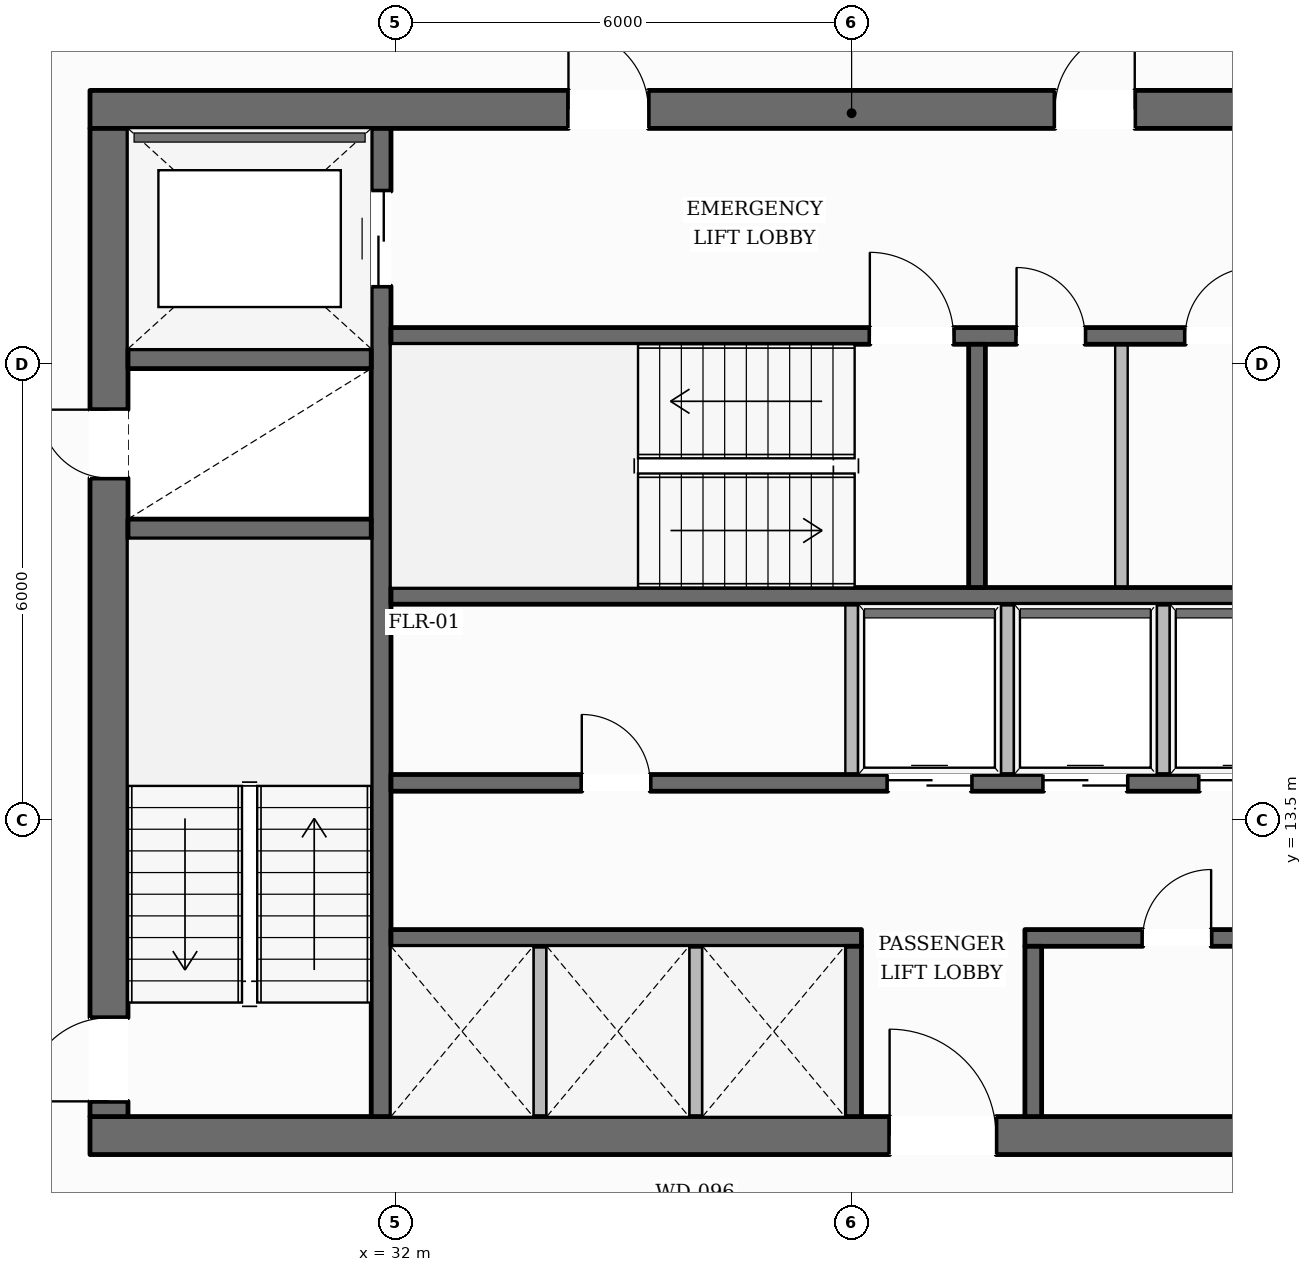
"""IFC4 building model, lengths in metres.
Left out: names, types, materials, properties, quantities, classifications, styles, units other than length and angle.
Written with IfcOpenShell. Run it as: python <this file> out.ifc"""

import sys

from ifc_helpers import new_model, si_unit, direction, frame, frame_2d, origin, place, context, subcontext, project, spatial, rectangle, extrude, element, fill, save


model = new_model("IFC4")
c1 = context("Model", 3, precision=1e-05, world=origin(), true_north=direction((0.0, 1.0)))
c2 = subcontext(c1, "Body", "Model", "MODEL_VIEW")
j1 = project(units=[si_unit("LENGTHUNIT", "METRE"), si_unit("PLANEANGLEUNIT", "RADIAN")], contexts=[c1])
p1 = place(None, origin())
s1 = spatial("IfcSite", under=j1, at=p1, CompositionType="ELEMENT")
p2 = place(p1, origin())
s2 = spatial("IfcBuilding", under=s1, at=p2, CompositionType="ELEMENT")
p3 = place(p2, frame((0.0, 0.0, 120.15)))
s3 = spatial("IfcBuildingStorey", under=s2, at=p3, CompositionType="ELEMENT", Elevation=120.15)
p4 = place(p3, frame((27.98, 9.35, 0.0), z_axis=(0.0, 0.0, 1.0), x_axis=(1.0, 0.0, 0.0)))
e1 = element("IfcWall", 1, at=p4, inside=s3, PredefinedType="SOLIDWALL", context=c2, shape_type="SweptSolid", body=[
    extrude(rectangle(XDim=20.04, YDim=0.5, at=frame_2d((10.02, 0.0))), origin(), (0.0, 0.0, 1.0), 3.6),
])
p5 = place(p4, frame((10.52, 0.0, 0.0)))
e2 = element("IfcOpeningElement", 2, at=p5, cuts=e1, PredefinedType="OPENING", context=c2, shape_type="SweptSolid", body=[
    extrude(rectangle(XDim=1.4, YDim=2.2, at=frame_2d((0.7, 1.1))), frame((0.0, 0.26, 0.0), z_axis=(0.0, -1.0, 0.0), x_axis=(1.0, 0.0, 0.0)), (0.0, 0.0, 1.0), 0.52),
])
p6 = place(p3, frame((27.98, 22.85, 0.0), z_axis=(0.0, 0.0, 1.0), x_axis=(1.0, 0.0, 0.0)))
e3 = element("IfcWall", 3, at=p6, inside=s3, PredefinedType="SOLIDWALL", context=c2, shape_type="SweptSolid", body=[
    extrude(rectangle(XDim=20.04, YDim=0.5, at=frame_2d((10.02, 0.0))), origin(), (0.0, 0.0, 1.0), 3.6),
])
p7 = place(p6, frame((6.295, 0.0, 0.0)))
e4 = element("IfcOpeningElement", 4, at=p7, cuts=e3, PredefinedType="OPENING", context=c2, shape_type="SweptSolid", body=[
    extrude(rectangle(XDim=1.05, YDim=2.15, at=frame_2d((0.525, 1.075))), frame((0.0, 0.26, 0.0), z_axis=(0.0, -1.0, 0.0), x_axis=(1.0, 0.0, 0.0)), (0.0, 0.0, 1.0), 0.52),
])
p8 = place(p6, frame((12.695, 0.0, 0.0)))
e5 = element("IfcOpeningElement", 5, at=p8, cuts=e3, PredefinedType="OPENING", context=c2, shape_type="SweptSolid", body=[
    extrude(rectangle(XDim=1.05, YDim=2.15, at=frame_2d((0.525, 1.075))), frame((0.0, 0.26, 0.0), z_axis=(0.0, -1.0, 0.0), x_axis=(1.0, 0.0, 0.0)), (0.0, 0.0, 1.0), 0.52),
])
p9 = place(p3, frame((28.23, 9.6, 0.0), z_axis=(0.0, 0.0, 1.0), x_axis=(0.0, 1.0, 0.0)))
e6 = element("IfcWall", 6, at=p9, inside=s3, PredefinedType="SOLIDWALL", context=c2, shape_type="SweptSolid", body=[
    extrude(rectangle(XDim=13.0, YDim=0.5, at=frame_2d((6.5, 0.0))), origin(), (0.0, 0.0, 1.0), 3.6),
])
p10 = place(p9, frame((0.2, 0.0, 0.0)))
e7 = element("IfcOpeningElement", 7, at=p10, cuts=e6, PredefinedType="OPENING", context=c2, shape_type="SweptSolid", body=[
    extrude(rectangle(XDim=1.1, YDim=2.15, at=frame_2d((0.55, 1.075))), frame((0.0, 0.26, 0.0), z_axis=(0.0, -1.0, 0.0), x_axis=(1.0, 0.0, 0.0)), (0.0, 0.0, 1.0), 0.52),
])
p11 = place(p9, frame((8.4, 0.0, 0.0)))
e8 = element("IfcOpeningElement", 8, at=p11, cuts=e6, PredefinedType="OPENING", context=c2, shape_type="SweptSolid", body=[
    extrude(rectangle(XDim=0.9, YDim=2.1, at=frame_2d((0.45, 1.05))), frame((0.0, 0.26, 0.0), z_axis=(0.0, -1.0, 0.0), x_axis=(1.0, 0.0, 0.0)), (0.0, 0.0, 1.0), 0.52),
])
p12 = place(p3, frame((31.81, 9.6, 0.0), z_axis=(0.0, 0.0, 1.0), x_axis=(0.0, 1.0, 0.0)))
e9 = element("IfcWall", 9, at=p12, inside=s3, PredefinedType="SHEAR", context=c2, shape_type="SweptSolid", body=[
    extrude(rectangle(XDim=13.0, YDim=0.26, at=frame_2d((6.5, 0.0))), origin(), (0.0, 0.0, 1.0), 3.6),
])
p13 = place(p12, frame((10.925, 0.0, 0.0)))
e10 = element("IfcOpeningElement", 10, at=p13, cuts=e9, PredefinedType="OPENING", context=c2, shape_type="SweptSolid", body=[
    extrude(rectangle(XDim=1.25, YDim=2.25, at=frame_2d((0.625, 1.125))), frame((0.0, 0.14, 0.0), z_axis=(0.0, -1.0, 0.0), x_axis=(1.0, 0.0, 0.0)), (0.0, 0.0, 1.0), 0.28),
])
for number, where, z_axis, x_axis in (
    (11, (28.48, 17.33, 0.0), (0.0, 0.0, 1.0), (1.0, 0.0, 0.0)),
    (12, (28.48, 19.57, 0.0), (0.0, 0.0, 1.0), (1.0, 0.0, 0.0)),
):
    element("IfcWall", number, at=place(p3, frame(where, z_axis=z_axis, x_axis=x_axis)), inside=s3, PredefinedType="SHEAR", context=c2, shape_type="SweptSolid", body=[
        extrude(rectangle(XDim=3.2, YDim=0.26, at=frame_2d((1.6, 0.0))), origin(), (0.0, 0.0, 1.0), 3.6),
    ])
p14 = place(p3, frame((31.94, 19.87, 0.0), z_axis=(0.0, 0.0, 1.0), x_axis=(1.0, 0.0, 0.0)))
e13 = element("IfcWall", 13, at=p14, inside=s3, PredefinedType="SOLIDWALL", context=c2, shape_type="SweptSolid", body=[
    extrude(rectangle(XDim=12.12, YDim=0.22, at=frame_2d((6.06, 0.0))), origin(), (0.0, 0.0, 1.0), 3.6),
])
p15 = place(p14, frame((6.3, 0.0, 0.0)))
e14 = element("IfcOpeningElement", 14, at=p15, cuts=e13, PredefinedType="OPENING", context=c2, shape_type="SweptSolid", body=[
    extrude(rectangle(XDim=1.1, YDim=2.15, at=frame_2d((0.55, 1.075))), frame((0.0, 0.12, 0.0), z_axis=(0.0, -1.0, 0.0), x_axis=(1.0, 0.0, 0.0)), (0.0, 0.0, 1.0), 0.24),
])
p16 = place(p14, frame((8.23, 0.0, 0.0)))
e15 = element("IfcOpeningElement", 15, at=p16, cuts=e13, PredefinedType="OPENING", context=c2, shape_type="SweptSolid", body=[
    extrude(rectangle(XDim=0.9, YDim=2.1, at=frame_2d((0.45, 1.05))), frame((0.0, 0.12, 0.0), z_axis=(0.0, -1.0, 0.0), x_axis=(1.0, 0.0, 0.0)), (0.0, 0.0, 1.0), 0.24),
])
p17 = place(p14, frame((10.45, 0.0, 0.0)))
e16 = element("IfcOpeningElement", 16, at=p17, cuts=e13, PredefinedType="OPENING", context=c2, shape_type="SweptSolid", body=[
    extrude(rectangle(XDim=0.9, YDim=2.1, at=frame_2d((0.45, 1.05))), frame((0.0, 0.12, 0.0), z_axis=(0.0, -1.0, 0.0), x_axis=(1.0, 0.0, 0.0)), (0.0, 0.0, 1.0), 0.24),
])
p18 = place(p3, frame((31.94, 16.45, 0.0), z_axis=(0.0, 0.0, 1.0), x_axis=(1.0, 0.0, 0.0)))
e17 = element("IfcWall", 17, at=p18, inside=s3, PredefinedType="SOLIDWALL", context=c2, shape_type="SweptSolid", body=[
    extrude(rectangle(XDim=12.12, YDim=0.22, at=frame_2d((6.06, 0.0))), origin(), (0.0, 0.0, 1.0), 3.6),
])
p19 = place(p3, frame((39.65, 16.56, 0.0), z_axis=(0.0, 0.0, 1.0), x_axis=(0.0, 1.0, 0.0)))
e18 = element("IfcWall", 18, at=p19, inside=s3, PredefinedType="SOLIDWALL", context=c2, shape_type="SweptSolid", body=[
    extrude(rectangle(XDim=3.2, YDim=0.22, at=frame_2d((1.6, 0.0))), origin(), (0.0, 0.0, 1.0), 3.6),
])
p20 = place(p3, frame((31.94, 13.99, 0.0), z_axis=(0.0, 0.0, 1.0), x_axis=(1.0, 0.0, 0.0)))
e19 = element("IfcWall", 19, at=p20, inside=s3, PredefinedType="SOLIDWALL", context=c2, shape_type="SweptSolid", body=[
    extrude(rectangle(XDim=12.12, YDim=0.22, at=frame_2d((6.06, 0.0))), origin(), (0.0, 0.0, 1.0), 3.6),
])
p21 = place(p20, frame((2.51, 0.0, 0.0)))
e20 = element("IfcOpeningElement", 20, at=p21, cuts=e19, PredefinedType="OPENING", context=c2, shape_type="SweptSolid", body=[
    extrude(rectangle(XDim=0.9, YDim=2.1, at=frame_2d((0.45, 1.05))), frame((0.0, 0.12, 0.0), z_axis=(0.0, -1.0, 0.0), x_axis=(1.0, 0.0, 0.0)), (0.0, 0.0, 1.0), 0.24),
])
p22 = place(p20, frame((6.535, 0.0, 0.0)))
e21 = element("IfcOpeningElement", 21, at=p22, cuts=e19, PredefinedType="OPENING", context=c2, shape_type="SweptSolid", body=[
    extrude(rectangle(XDim=1.1, YDim=2.2, at=frame_2d((0.55, 1.1))), frame((0.0, 0.12, 0.0), z_axis=(0.0, -1.0, 0.0), x_axis=(1.0, 0.0, 0.0)), (0.0, 0.0, 1.0), 0.24),
])
p23 = place(p20, frame((8.585, 0.0, 0.0)))
e22 = element("IfcOpeningElement", 22, at=p23, cuts=e19, PredefinedType="OPENING", context=c2, shape_type="SweptSolid", body=[
    extrude(rectangle(XDim=1.1, YDim=2.2, at=frame_2d((0.55, 1.1))), frame((0.0, 0.12, 0.0), z_axis=(0.0, -1.0, 0.0), x_axis=(1.0, 0.0, 0.0)), (0.0, 0.0, 1.0), 0.24),
])
p24 = place(p20, frame((10.635, 0.0, 0.0)))
e23 = element("IfcOpeningElement", 23, at=p24, cuts=e19, PredefinedType="OPENING", context=c2, shape_type="SweptSolid", body=[
    extrude(rectangle(XDim=1.1, YDim=2.2, at=frame_2d((0.55, 1.1))), frame((0.0, 0.12, 0.0), z_axis=(0.0, -1.0, 0.0), x_axis=(1.0, 0.0, 0.0)), (0.0, 0.0, 1.0), 0.24),
])
p25 = place(p3, frame((31.94, 11.95, 0.0), z_axis=(0.0, 0.0, 1.0), x_axis=(1.0, 0.0, 0.0)))
e24 = element("IfcWall", 24, at=p25, inside=s3, PredefinedType="SOLIDWALL", context=c2, shape_type="SweptSolid", body=[
    extrude(rectangle(XDim=6.19, YDim=0.22, at=frame_2d((3.095, 0.0))), origin(), (0.0, 0.0, 1.0), 3.6),
])
p26 = place(p3, frame((40.28, 11.95, 0.0), z_axis=(0.0, 0.0, 1.0), x_axis=(1.0, 0.0, 0.0)))
e25 = element("IfcWall", 25, at=p26, inside=s3, PredefinedType="SOLIDWALL", context=c2, shape_type="SweptSolid", body=[
    extrude(rectangle(XDim=3.78, YDim=0.22, at=frame_2d((1.89, 0.0))), origin(), (0.0, 0.0, 1.0), 3.6),
])
p27 = place(p26, frame((1.55, 0.0, 0.0)))
e26 = element("IfcOpeningElement", 26, at=p27, cuts=e25, PredefinedType="OPENING", context=c2, shape_type="SweptSolid", body=[
    extrude(rectangle(XDim=0.9, YDim=2.1, at=frame_2d((0.45, 1.05))), frame((0.0, 0.12, 0.0), z_axis=(0.0, -1.0, 0.0), x_axis=(1.0, 0.0, 0.0)), (0.0, 0.0, 1.0), 0.24),
])
for number, where, z_axis, x_axis in (
    (27, (38.02, 9.6, 0.0), (0.0, 0.0, 1.0), (0.0, 1.0, 0.0)),
    (28, (40.39, 9.6, 0.0), (0.0, 0.0, 1.0), (0.0, 1.0, 0.0)),
):
    element("IfcWall", number, at=place(p3, frame(where, z_axis=z_axis, x_axis=x_axis)), inside=s3, PredefinedType="SOLIDWALL", context=c2, shape_type="SweptSolid", body=[
        extrude(rectangle(XDim=2.24, YDim=0.22, at=frame_2d((1.12, 0.0))), origin(), (0.0, 0.0, 1.0), 3.6),
    ])
p28 = place(p3, frame((13.966, 12.858, 0.0), z_axis=(0.0, 0.0, 1.0), x_axis=(0.499138995893, 0.86652193439, 0.0)))
e29 = element("IfcWall", 29, at=p28, inside=s3, PredefinedType="STANDARD", context=c2, shape_type="SweptSolid", body=[
    extrude(rectangle(XDim=36.509, YDim=0.38, at=frame_2d((18.255, 0.0))), origin(), (0.0, 0.0, 1.0), 3.059),
])
p29 = place(p28, frame((8.727, 0.0, 0.0)))
e30 = element("IfcOpeningElement", 30, at=p29, cuts=e29, PredefinedType="OPENING", context=c2, shape_type="SweptSolid", body=[
    extrude(rectangle(XDim=1.0, YDim=2.2, at=frame_2d((0.5, 1.1))), frame((0.0, 0.2, 0.0), z_axis=(0.0, -1.0, 0.0), x_axis=(1.0, 0.0, 0.0)), (0.0, 0.0, 1.0), 0.4),
])
p30 = place(p28, frame((32.292, 0.0, 0.65)))
e31 = element("IfcOpeningElement", 31, at=p30, cuts=e29, PredefinedType="OPENING", context=c2, shape_type="SweptSolid", body=[
    extrude(rectangle(XDim=1.55, YDim=1.75, at=frame_2d((0.775, 0.875))), frame((0.0, 0.2, 0.0), z_axis=(0.0, -1.0, 0.0), x_axis=(1.0, 0.0, 0.0)), (0.0, 0.0, 1.0), 0.4),
])
p31 = place(p28, frame((26.367, 0.0, 0.65)))
e32 = element("IfcOpeningElement", 32, at=p31, cuts=e29, PredefinedType="OPENING", context=c2, shape_type="SweptSolid", body=[
    extrude(rectangle(XDim=1.55, YDim=1.75, at=frame_2d((0.775, 0.875))), frame((0.0, 0.2, 0.0), z_axis=(0.0, -1.0, 0.0), x_axis=(1.0, 0.0, 0.0)), (0.0, 0.0, 1.0), 0.4),
])
p32 = place(p28, frame((20.442, 0.0, 0.65)))
e33 = element("IfcOpeningElement", 33, at=p32, cuts=e29, PredefinedType="OPENING", context=c2, shape_type="SweptSolid", body=[
    extrude(rectangle(XDim=1.55, YDim=1.75, at=frame_2d((0.775, 0.875))), frame((0.0, 0.2, 0.0), z_axis=(0.0, -1.0, 0.0), x_axis=(1.0, 0.0, 0.0)), (0.0, 0.0, 1.0), 0.4),
])
p33 = place(p28, frame((2.666, 0.0, 0.65)))
e34 = element("IfcOpeningElement", 34, at=p33, cuts=e29, PredefinedType="OPENING", context=c2, shape_type="SweptSolid", body=[
    extrude(rectangle(XDim=1.55, YDim=1.75, at=frame_2d((0.775, 0.875))), frame((0.0, 0.2, 0.0), z_axis=(0.0, -1.0, 0.0), x_axis=(1.0, 0.0, 0.0)), (0.0, 0.0, 1.0), 0.4),
])
for number, where, z_axis, x_axis in (
    (35, (33.9, 9.55, 0.0), (0.0, 0.0, 1.0), (0.0, 1.0, 0.0)),
    (36, (35.95, 9.55, 0.0), (0.0, 0.0, 1.0), (0.0, 1.0, 0.0)),
):
    element("IfcWall", number, at=place(p3, frame(where, z_axis=z_axis, x_axis=x_axis)), inside=s3, PredefinedType="PARTITIONING", context=c2, shape_type="SweptSolid", body=[
        extrude(rectangle(XDim=2.29, YDim=0.165, at=frame_2d((1.145, 0.0))), origin(), (0.0, 0.0, 1.0), 3.6),
    ])
for number, where, z_axis, x_axis in (
    (37, (38.0, 14.1, 0.0), (0.0, 0.0, 1.0), (0.0, 1.0, 0.0)),
    (38, (40.05, 14.1, 0.0), (0.0, 0.0, 1.0), (0.0, 1.0, 0.0)),
    (39, (42.1, 14.1, 0.0), (0.0, 0.0, 1.0), (0.0, 1.0, 0.0)),
):
    element("IfcWall", number, at=place(p3, frame(where, z_axis=z_axis, x_axis=x_axis)), inside=s3, PredefinedType="PARTITIONING", context=c2, shape_type="SweptSolid", body=[
        extrude(rectangle(XDim=2.24, YDim=0.165, at=frame_2d((1.12, 0.0))), origin(), (0.0, 0.0, 1.0), 3.6),
    ])
p34 = place(p3, frame((41.55, 16.56, 0.0), z_axis=(0.0, 0.0, 1.0), x_axis=(0.0, 1.0, 0.0)))
e40 = element("IfcWall", 40, at=p34, inside=s3, PredefinedType="PARTITIONING", context=c2, shape_type="SweptSolid", body=[
    extrude(rectangle(XDim=3.2, YDim=0.165, at=frame_2d((1.6, 0.0))), origin(), (0.0, 0.0, 1.0), 3.6),
])
p35 = place(p10, origin())
e41 = element("IfcDoor", 41, at=p35, inside=s3, OperationType="SINGLE_SWING_LEFT", PredefinedType="DOOR", context=c2, shape_type="SweptSolid", body=[
    extrude(rectangle(XDim=1.1, YDim=2.15, at=frame_2d((0.55, 1.075))), frame((0.0, 0.025, 0.0), z_axis=(0.0, -1.0, 0.0), x_axis=(1.0, 0.0, 0.0)), (0.0, 0.0, 1.0), 0.05),
])
fill(e7, e41)
p36 = place(p15, origin())
e42 = element("IfcDoor", 42, at=p36, inside=s3, OperationType="SINGLE_SWING_LEFT", PredefinedType="DOOR", context=c2, shape_type="SweptSolid", body=[
    extrude(rectangle(XDim=1.1, YDim=2.15, at=frame_2d((0.55, 1.075))), frame((0.0, 0.025, 0.0), z_axis=(0.0, -1.0, 0.0), x_axis=(1.0, 0.0, 0.0)), (0.0, 0.0, 1.0), 0.05),
])
fill(e14, e42)
p37 = place(p11, origin())
e43 = element("IfcDoor", 43, at=p37, inside=s3, OperationType="SINGLE_SWING_RIGHT", PredefinedType="DOOR", context=c2, shape_type="SweptSolid", body=[
    extrude(rectangle(XDim=0.9, YDim=2.1, at=frame_2d((0.45, 1.05))), frame((0.0, 0.025, 0.0), z_axis=(0.0, -1.0, 0.0), x_axis=(1.0, 0.0, 0.0)), (0.0, 0.0, 1.0), 0.05),
])
fill(e8, e43)
p38 = place(p7, origin())
e44 = element("IfcDoor", 44, at=p38, inside=s3, OperationType="SINGLE_SWING_LEFT", PredefinedType="DOOR", context=c2, shape_type="SweptSolid", body=[
    extrude(rectangle(XDim=1.05, YDim=2.15, at=frame_2d((0.525, 1.075))), frame((0.0, 0.025, 0.0), z_axis=(0.0, -1.0, 0.0), x_axis=(1.0, 0.0, 0.0)), (0.0, 0.0, 1.0), 0.05),
])
fill(e4, e44)
p39 = place(p8, origin())
e45 = element("IfcDoor", 45, at=p39, inside=s3, OperationType="SINGLE_SWING_RIGHT", PredefinedType="DOOR", context=c2, shape_type="SweptSolid", body=[
    extrude(rectangle(XDim=1.05, YDim=2.15, at=frame_2d((0.525, 1.075))), frame((0.0, 0.025, 0.0), z_axis=(0.0, -1.0, 0.0), x_axis=(1.0, 0.0, 0.0)), (0.0, 0.0, 1.0), 0.05),
])
fill(e5, e45)
p40 = place(p13, origin())
e46 = element("IfcDoor", 46, at=p40, inside=s3, OperationType="DOUBLE_DOOR_SLIDING", PredefinedType="DOOR", context=c2, shape_type="SweptSolid", body=[
    extrude(rectangle(XDim=1.25, YDim=2.25, at=frame_2d((0.625, 1.125))), frame((0.0, 0.025, 0.0), z_axis=(0.0, -1.0, 0.0), x_axis=(1.0, 0.0, 0.0)), (0.0, 0.0, 1.0), 0.05),
])
fill(e10, e46)
p41 = place(p5, origin())
e47 = element("IfcDoor", 47, at=p41, inside=s3, OperationType="SINGLE_SWING_LEFT", PredefinedType="DOOR", context=c2, shape_type="SweptSolid", body=[
    extrude(rectangle(XDim=1.4, YDim=2.2, at=frame_2d((0.7, 1.1))), frame((0.0, 0.025, 0.0), z_axis=(0.0, -1.0, 0.0), x_axis=(1.0, 0.0, 0.0)), (0.0, 0.0, 1.0), 0.05),
])
fill(e2, e47)
p42 = place(p21, origin())
e48 = element("IfcDoor", 48, at=p42, inside=s3, OperationType="SINGLE_SWING_LEFT", PredefinedType="DOOR", context=c2, shape_type="SweptSolid", body=[
    extrude(rectangle(XDim=0.9, YDim=2.1, at=frame_2d((0.45, 1.05))), frame((0.0, 0.025, 0.0), z_axis=(0.0, -1.0, 0.0), x_axis=(1.0, 0.0, 0.0)), (0.0, 0.0, 1.0), 0.05),
])
fill(e20, e48)
p43 = place(p22, origin())
e49 = element("IfcDoor", 49, at=p43, inside=s3, OperationType="DOUBLE_DOOR_SLIDING", PredefinedType="DOOR", context=c2, shape_type="SweptSolid", body=[
    extrude(rectangle(XDim=1.1, YDim=2.2, at=frame_2d((0.55, 1.1))), frame((0.0, 0.025, 0.0), z_axis=(0.0, -1.0, 0.0), x_axis=(1.0, 0.0, 0.0)), (0.0, 0.0, 1.0), 0.05),
])
fill(e21, e49)
p44 = place(p23, origin())
e50 = element("IfcDoor", 50, at=p44, inside=s3, OperationType="DOUBLE_DOOR_SLIDING", PredefinedType="DOOR", context=c2, shape_type="SweptSolid", body=[
    extrude(rectangle(XDim=1.1, YDim=2.2, at=frame_2d((0.55, 1.1))), frame((0.0, 0.025, 0.0), z_axis=(0.0, -1.0, 0.0), x_axis=(1.0, 0.0, 0.0)), (0.0, 0.0, 1.0), 0.05),
])
fill(e22, e50)
p45 = place(p24, origin())
e51 = element("IfcDoor", 51, at=p45, inside=s3, OperationType="DOUBLE_DOOR_SLIDING", PredefinedType="DOOR", context=c2, shape_type="SweptSolid", body=[
    extrude(rectangle(XDim=1.1, YDim=2.2, at=frame_2d((0.55, 1.1))), frame((0.0, 0.025, 0.0), z_axis=(0.0, -1.0, 0.0), x_axis=(1.0, 0.0, 0.0)), (0.0, 0.0, 1.0), 0.05),
])
fill(e23, e51)
p46 = place(p16, origin())
e52 = element("IfcDoor", 52, at=p46, inside=s3, OperationType="SINGLE_SWING_LEFT", PredefinedType="DOOR", context=c2, shape_type="SweptSolid", body=[
    extrude(rectangle(XDim=0.9, YDim=2.1, at=frame_2d((0.45, 1.05))), frame((0.0, 0.025, 0.0), z_axis=(0.0, -1.0, 0.0), x_axis=(1.0, 0.0, 0.0)), (0.0, 0.0, 1.0), 0.05),
])
fill(e15, e52)
p47 = place(p17, origin())
e53 = element("IfcDoor", 53, at=p47, inside=s3, OperationType="SINGLE_SWING_RIGHT", PredefinedType="DOOR", context=c2, shape_type="SweptSolid", body=[
    extrude(rectangle(XDim=0.9, YDim=2.1, at=frame_2d((0.45, 1.05))), frame((0.0, 0.025, 0.0), z_axis=(0.0, -1.0, 0.0), x_axis=(1.0, 0.0, 0.0)), (0.0, 0.0, 1.0), 0.05),
])
fill(e16, e53)
p48 = place(p27, origin())
e54 = element("IfcDoor", 54, at=p48, inside=s3, OperationType="SINGLE_SWING_RIGHT", PredefinedType="DOOR", context=c2, shape_type="SweptSolid", body=[
    extrude(rectangle(XDim=0.9, YDim=2.1, at=frame_2d((0.45, 1.05))), frame((0.0, 0.025, 0.0), z_axis=(0.0, -1.0, 0.0), x_axis=(1.0, 0.0, 0.0)), (0.0, 0.0, 1.0), 0.05),
])
fill(e26, e54)
save(model, sys.argv[1])
